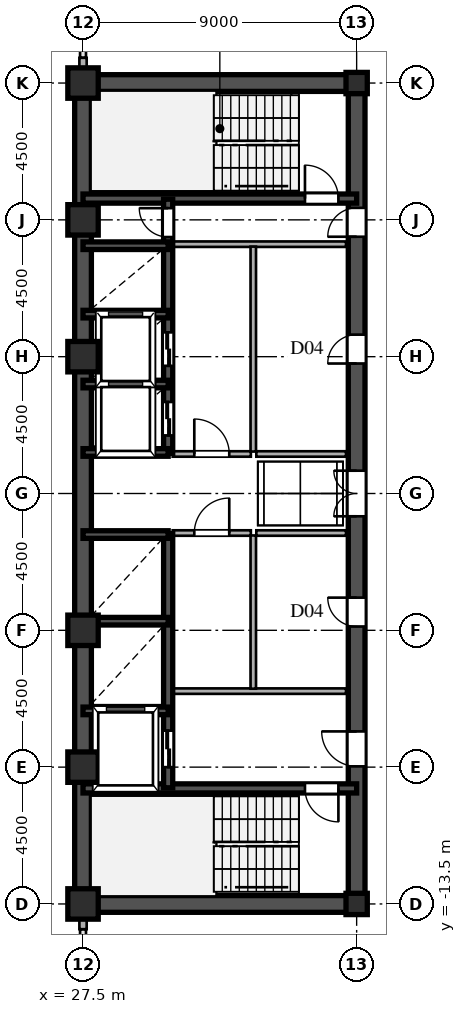
"""IFC4 building model, lengths in metres.
Left out: names, types, materials, properties, quantities, classifications, styles, units other than length and angle.
Written with IfcOpenShell. Run it as: python <this file> out.ifc"""

import sys

from ifc_helpers import new_model, si_unit, direction, frame, frame_2d, origin, origin_2d, place, context, subcontext, project, spatial, rectangle, hollow_rectangle, i_section, extrude, source, transform, mapped, element, fill, save


model = new_model("IFC4")
c1 = context("Model", 3, precision=1e-05, world=origin(), true_north=direction((0.0, 1.0)))
c2 = subcontext(c1, "Body", "Model", "MODEL_VIEW")
j1 = project(units=[si_unit("LENGTHUNIT", "METRE"), si_unit("PLANEANGLEUNIT", "RADIAN")], contexts=[c1])
p1 = place(None, origin())
s1 = spatial("IfcSite", under=j1, at=p1, CompositionType="ELEMENT")
p2 = place(p1, origin())
s2 = spatial("IfcBuilding", under=s1, at=p2, CompositionType="ELEMENT")
p3 = place(p2, frame((0.0, 0.0, 140.4)))
s3 = spatial("IfcBuildingStorey", under=s2, at=p3, CompositionType="ELEMENT", Elevation=140.4)
m1 = source(origin(), c2, "Body", "SweptSolid", [
    extrude(hollow_rectangle(XDim=1.0, YDim=1.0, WallThickness=0.042, at=origin_2d()), origin(), (0.0, 0.0, 1.0), 3.6),
])
for number, where, z_axis, x_axis in (
    (1, (27.5, -13.5, 0.0), (0.0, 0.0, 1.0), (1.0, 0.0, 0.0)),
    (2, (27.5, -9.0, 0.0), (0.0, 0.0, 1.0), (1.0, 0.0, 0.0)),
    (3, (27.5, -4.5, 0.0), (0.0, 0.0, 1.0), (1.0, 0.0, 0.0)),
    (4, (27.5, 4.5, 0.0), (0.0, 0.0, 1.0), (1.0, 0.0, 0.0)),
    (5, (27.5, 9.0, 0.0), (0.0, 0.0, 1.0), (1.0, 0.0, 0.0)),
    (6, (27.5, 13.5, 0.0), (0.0, 0.0, 1.0), (1.0, 0.0, 0.0)),
):
    element("IfcColumn", number, at=place(p3, frame(where, z_axis=z_axis, x_axis=x_axis)), inside=s3, PredefinedType="COLUMN", context=c2, shape_type="MappedRepresentation", body=[
        mapped(m1, transform((0.0, 0.0, 0.0), scale=1.0)),
    ])
m2 = source(origin(), c2, "Body", "SweptSolid", [
    extrude(i_section(OverallWidth=0.7, OverallDepth=0.7, WebThickness=0.028, FlangeThickness=0.045, at=origin_2d()), origin(), (0.0, 0.0, 1.0), 3.6),
])
for number, where, z_axis, x_axis in (
    (7, (36.5, -13.5, 0.0), (0.0, 0.0, 1.0), (1.0, 0.0, 0.0)),
    (8, (36.5, 13.5, 0.0), (0.0, 0.0, 1.0), (1.0, 0.0, 0.0)),
):
    element("IfcColumn", number, at=place(p3, frame(where, z_axis=z_axis, x_axis=x_axis)), inside=s3, PredefinedType="COLUMN", context=c2, shape_type="MappedRepresentation", body=[
        mapped(m2, transform((0.0, 0.0, 0.0), scale=1.0)),
    ])
for number, where, z_axis, x_axis in (
    (9, (27.5, -14.33, 0.0), (0.0, 0.0, 1.0), (0.0, 1.0, 0.0)),
    (10, (27.5, 13.78, 0.0), (0.0, 0.0, 1.0), (0.0, 1.0, 0.0)),
):
    element("IfcWall", number, at=place(p3, frame(where, z_axis=z_axis, x_axis=x_axis)), inside=s3, PredefinedType="SOLIDWALL", context=c2, shape_type="SweptSolid", body=[
        extrude(rectangle(XDim=0.55, YDim=0.24, at=frame_2d((0.275, 0.0))), origin(), (0.0, 0.0, 1.0), 2.88),
    ])
for number, where, z_axis, x_axis in (
    (11, (27.5, -13.5, 0.0), (0.0, 0.0, 1.0), (0.0, 1.0, 0.0)),
    (12, (27.5, 1.3, 0.0), (0.0, 0.0, 1.0), (0.0, 1.0, 0.0)),
):
    element("IfcWall", number, at=place(p3, frame(where, z_axis=z_axis, x_axis=x_axis)), inside=s3, PredefinedType="SHEAR", context=c2, shape_type="SweptSolid", body=[
        extrude(rectangle(XDim=12.2, YDim=0.55, at=frame_2d((6.1, 0.0))), origin(), (0.0, 0.0, 1.0), 3.38),
    ])
p4 = place(p3, frame((27.5, -1.3, 0.0), z_axis=(0.0, 0.0, 1.0), x_axis=(0.0, 1.0, 0.0)))
e13 = element("IfcWall", 13, at=p4, inside=s3, PredefinedType="SHEAR", context=c2, shape_type="SweptSolid", body=[
    extrude(rectangle(XDim=2.6, YDim=0.55, at=frame_2d((1.3, 0.0))), origin(), (0.0, 0.0, 1.0), 3.38),
])
for number, where, z_axis, x_axis in (
    (14, (27.5, -13.5, 0.0), (0.0, 0.0, 1.0), (1.0, 0.0, 0.0)),
    (15, (27.5, 13.5, 0.0), (0.0, 0.0, 1.0), (1.0, 0.0, 0.0)),
):
    element("IfcWall", number, at=place(p3, frame(where, z_axis=z_axis, x_axis=x_axis)), inside=s3, PredefinedType="SHEAR", context=c2, shape_type="SweptSolid", body=[
        extrude(rectangle(XDim=9.0, YDim=0.55, at=frame_2d((4.5, 0.0))), origin(), (0.0, 0.0, 1.0), 3.38),
    ])
p5 = place(p3, frame((36.5, -13.65, 0.0), z_axis=(0.0, 0.0, 1.0), x_axis=(0.0, 1.0, 0.0)))
e16 = element("IfcWall", 16, at=p5, inside=s3, PredefinedType="SHEAR", context=c2, shape_type="SweptSolid", body=[
    extrude(rectangle(XDim=7.15, YDim=0.55, at=frame_2d((3.575, 0.0))), origin(), (0.0, 0.0, 1.0), 3.38),
])
p6 = place(p5, frame((4.675, 0.0, 0.0)))
e17 = element("IfcOpeningElement", 17, at=p6, cuts=e16, PredefinedType="OPENING", context=c2, shape_type="SweptSolid", body=[
    extrude(rectangle(XDim=1.15, YDim=2.2, at=frame_2d((0.575, 1.1))), frame((0.0, 0.285, 0.0), z_axis=(0.0, -1.0, 0.0), x_axis=(1.0, 0.0, 0.0)), (0.0, 0.0, 1.0), 0.57),
])
p7 = place(p3, frame((36.5, -1.3, 0.0), z_axis=(0.0, 0.0, 1.0), x_axis=(0.0, 1.0, 0.0)))
e18 = element("IfcWall", 18, at=p7, inside=s3, PredefinedType="SHEAR", context=c2, shape_type="SweptSolid", body=[
    extrude(rectangle(XDim=2.6, YDim=0.55, at=frame_2d((1.3, 0.0))), origin(), (0.0, 0.0, 1.0), 3.38),
])
p8 = place(p7, frame((0.55, 0.0, 0.0)))
e19 = element("IfcOpeningElement", 19, at=p8, cuts=e18, PredefinedType="OPENING", context=c2, shape_type="SweptSolid", body=[
    extrude(rectangle(XDim=1.5, YDim=2.3, at=frame_2d((0.75, 1.15))), frame((0.0, 0.285, 0.0), z_axis=(0.0, -1.0, 0.0), x_axis=(1.0, 0.0, 0.0)), (0.0, 0.0, 1.0), 0.57),
])
p9 = place(p3, frame((36.5, 8.2, 0.0), z_axis=(0.0, 0.0, 1.0), x_axis=(0.0, 1.0, 0.0)))
e20 = element("IfcWall", 20, at=p9, inside=s3, PredefinedType="SHEAR", context=c2, shape_type="SweptSolid", body=[
    extrude(rectangle(XDim=5.45, YDim=0.55, at=frame_2d((2.725, 0.0))), origin(), (0.0, 0.0, 1.0), 3.38),
])
p10 = place(p9, frame((0.245, 0.0, 0.0)))
e21 = element("IfcOpeningElement", 21, at=p10, cuts=e20, PredefinedType="OPENING", context=c2, shape_type="SweptSolid", body=[
    extrude(rectangle(XDim=0.95, YDim=2.15, at=frame_2d((0.475, 1.075))), frame((0.0, 0.285, 0.0), z_axis=(0.0, -1.0, 0.0), x_axis=(1.0, 0.0, 0.0)), (0.0, 0.0, 1.0), 0.57),
])
p11 = place(p3, frame((36.5, -6.5, 0.0), z_axis=(0.0, 0.0, 1.0), x_axis=(0.0, 1.0, 0.0)))
e22 = element("IfcWall", 22, at=p11, inside=s3, PredefinedType="SHEAR", context=c2, shape_type="SweptSolid", body=[
    extrude(rectangle(XDim=5.2, YDim=0.55, at=frame_2d((2.6, 0.0))), origin(), (0.0, 0.0, 1.0), 3.38),
])
p12 = place(p11, frame((2.125, 0.0, 0.0)))
e23 = element("IfcOpeningElement", 23, at=p12, cuts=e22, PredefinedType="OPENING", context=c2, shape_type="SweptSolid", body=[
    extrude(rectangle(XDim=0.95, YDim=2.15, at=frame_2d((0.475, 1.075))), frame((0.0, 0.285, 0.0), z_axis=(0.0, -1.0, 0.0), x_axis=(1.0, 0.0, 0.0)), (0.0, 0.0, 1.0), 0.57),
])
p13 = place(p3, frame((36.5, 1.3, 0.0), z_axis=(0.0, 0.0, 1.0), x_axis=(0.0, 1.0, 0.0)))
e24 = element("IfcWall", 24, at=p13, inside=s3, PredefinedType="SHEAR", context=c2, shape_type="SweptSolid", body=[
    extrude(rectangle(XDim=6.9, YDim=0.55, at=frame_2d((3.45, 0.0))), origin(), (0.0, 0.0, 1.0), 3.38),
])
p14 = place(p13, frame((2.975, 0.0, 0.0)))
e25 = element("IfcOpeningElement", 25, at=p14, cuts=e24, PredefinedType="OPENING", context=c2, shape_type="SweptSolid", body=[
    extrude(rectangle(XDim=0.95, YDim=2.15, at=frame_2d((0.475, 1.075))), frame((0.0, 0.285, 0.0), z_axis=(0.0, -1.0, 0.0), x_axis=(1.0, 0.0, 0.0)), (0.0, 0.0, 1.0), 0.57),
])
p15 = place(p3, frame((27.5, -9.7, 0.0), z_axis=(0.0, 0.0, 1.0), x_axis=(1.0, 0.0, 0.0)))
e26 = element("IfcWall", 26, at=p15, inside=s3, PredefinedType="SHEAR", context=c2, shape_type="SweptSolid", body=[
    extrude(rectangle(XDim=9.0, YDim=0.3, at=frame_2d((4.5, 0.0))), origin(), (0.0, 0.0, 1.0), 3.38),
])
p16 = place(p15, frame((7.3, 0.0, 0.0)))
e27 = element("IfcOpeningElement", 27, at=p16, cuts=e26, PredefinedType="OPENING", context=c2, shape_type="SweptSolid", body=[
    extrude(rectangle(XDim=1.1, YDim=2.2, at=frame_2d((0.55, 1.1))), frame((0.0, 0.16, 0.0), z_axis=(0.0, -1.0, 0.0), x_axis=(1.0, 0.0, 0.0)), (0.0, 0.0, 1.0), 0.32),
])
p17 = place(p3, frame((27.5, 9.7, 0.0), z_axis=(0.0, 0.0, 1.0), x_axis=(1.0, 0.0, 0.0)))
e28 = element("IfcWall", 28, at=p17, inside=s3, PredefinedType="SHEAR", context=c2, shape_type="SweptSolid", body=[
    extrude(rectangle(XDim=9.0, YDim=0.3, at=frame_2d((4.5, 0.0))), origin(), (0.0, 0.0, 1.0), 3.38),
])
p18 = place(p17, frame((7.3, 0.0, 0.0)))
e29 = element("IfcOpeningElement", 29, at=p18, cuts=e28, PredefinedType="OPENING", context=c2, shape_type="SweptSolid", body=[
    extrude(rectangle(XDim=1.1, YDim=2.2, at=frame_2d((0.55, 1.1))), frame((0.0, 0.16, 0.0), z_axis=(0.0, -1.0, 0.0), x_axis=(1.0, 0.0, 0.0)), (0.0, 0.0, 1.0), 0.32),
])
for number, where, z_axis, x_axis in (
    (30, (27.5, -7.15, 0.0), (0.0, 0.0, 1.0), (1.0, 0.0, 0.0)),
    (31, (27.5, -4.2, 0.0), (0.0, 0.0, 1.0), (1.0, 0.0, 0.0)),
    (32, (27.5, -1.35, 0.0), (0.0, 0.0, 1.0), (1.0, 0.0, 0.0)),
    (33, (27.5, 1.35, 0.0), (0.0, 0.0, 1.0), (1.0, 0.0, 0.0)),
    (34, (27.5, 3.6, 0.0), (0.0, 0.0, 1.0), (1.0, 0.0, 0.0)),
    (35, (27.5, 5.9, 0.0), (0.0, 0.0, 1.0), (1.0, 0.0, 0.0)),
    (36, (27.5, 8.15, 0.0), (0.0, 0.0, 1.0), (1.0, 0.0, 0.0)),
):
    element("IfcWall", number, at=place(p3, frame(where, z_axis=z_axis, x_axis=x_axis)), inside=s3, PredefinedType="SHEAR", context=c2, shape_type="SweptSolid", body=[
        extrude(rectangle(XDim=2.8, YDim=0.25, at=frame_2d((1.4, 0.0))), origin(), (0.0, 0.0, 1.0), 3.38),
    ])
p19 = place(p3, frame((30.3, -9.68, 0.0), z_axis=(0.0, 0.0, 1.0), x_axis=(0.0, 1.0, 0.0)))
e37 = element("IfcWall", 37, at=p19, inside=s3, PredefinedType="SHEAR", context=c2, shape_type="SweptSolid", body=[
    extrude(rectangle(XDim=2.56, YDim=0.3, at=frame_2d((1.28, 0.0))), origin(), (0.0, 0.0, 1.0), 3.38),
])
p20 = place(p19, frame((0.68, 0.0, 0.0)))
e38 = element("IfcOpeningElement", 38, at=p20, cuts=e37, PredefinedType="OPENING", context=c2, shape_type="SweptSolid", body=[
    extrude(rectangle(XDim=1.2, YDim=2.25, at=frame_2d((0.6, 1.125))), frame((0.0, 0.16, 0.0), z_axis=(0.0, -1.0, 0.0), x_axis=(1.0, 0.0, 0.0)), (0.0, 0.0, 1.0), 0.32),
])
p21 = place(p3, frame((30.3, -7.12, 0.0), z_axis=(0.0, 0.0, 1.0), x_axis=(0.0, 1.0, 0.0)))
e39 = element("IfcWall", 39, at=p21, inside=s3, PredefinedType="SHEAR", context=c2, shape_type="SweptSolid", body=[
    extrude(rectangle(XDim=5.8, YDim=0.3, at=frame_2d((2.9, 0.0))), origin(), (0.0, 0.0, 1.0), 3.38),
])
p22 = place(p3, frame((30.3, 1.32, 0.0), z_axis=(0.0, 0.0, 1.0), x_axis=(0.0, 1.0, 0.0)))
e40 = element("IfcWall", 40, at=p22, inside=s3, PredefinedType="SHEAR", context=c2, shape_type="SweptSolid", body=[
    extrude(rectangle(XDim=2.28, YDim=0.3, at=frame_2d((1.14, 0.0))), origin(), (0.0, 0.0, 1.0), 3.38),
])
p23 = place(p22, frame((0.59, 0.0, 0.0)))
e41 = element("IfcOpeningElement", 41, at=p23, cuts=e40, PredefinedType="OPENING", context=c2, shape_type="SweptSolid", body=[
    extrude(rectangle(XDim=1.1, YDim=2.2, at=frame_2d((0.55, 1.1))), frame((0.0, 0.16, 0.0), z_axis=(0.0, -1.0, 0.0), x_axis=(1.0, 0.0, 0.0)), (0.0, 0.0, 1.0), 0.32),
])
p24 = place(p3, frame((30.3, 3.6, 0.0), z_axis=(0.0, 0.0, 1.0), x_axis=(0.0, 1.0, 0.0)))
e42 = element("IfcWall", 42, at=p24, inside=s3, PredefinedType="SHEAR", context=c2, shape_type="SweptSolid", body=[
    extrude(rectangle(XDim=2.3, YDim=0.3, at=frame_2d((1.15, 0.0))), origin(), (0.0, 0.0, 1.0), 3.38),
])
p25 = place(p24, frame((0.6, 0.0, 0.0)))
e43 = element("IfcOpeningElement", 43, at=p25, cuts=e42, PredefinedType="OPENING", context=c2, shape_type="SweptSolid", body=[
    extrude(rectangle(XDim=1.1, YDim=2.2, at=frame_2d((0.55, 1.1))), frame((0.0, 0.16, 0.0), z_axis=(0.0, -1.0, 0.0), x_axis=(1.0, 0.0, 0.0)), (0.0, 0.0, 1.0), 0.32),
])
p26 = place(p3, frame((30.3, 5.9, 0.0), z_axis=(0.0, 0.0, 1.0), x_axis=(0.0, 1.0, 0.0)))
e44 = element("IfcWall", 44, at=p26, inside=s3, PredefinedType="SHEAR", context=c2, shape_type="SweptSolid", body=[
    extrude(rectangle(XDim=2.25, YDim=0.3, at=frame_2d((1.125, 0.0))), origin(), (0.0, 0.0, 1.0), 3.38),
])
p27 = place(p3, frame((30.3, 8.15, 0.0), z_axis=(0.0, 0.0, 1.0), x_axis=(0.0, 1.0, 0.0)))
e45 = element("IfcWall", 45, at=p27, inside=s3, PredefinedType="SHEAR", context=c2, shape_type="SweptSolid", body=[
    extrude(rectangle(XDim=1.53, YDim=0.3, at=frame_2d((0.765, 0.0))), origin(), (0.0, 0.0, 1.0), 3.38),
])
p28 = place(p27, frame((0.285, 0.0, 0.0)))
e46 = element("IfcOpeningElement", 46, at=p28, cuts=e45, PredefinedType="OPENING", context=c2, shape_type="SweptSolid", body=[
    extrude(rectangle(XDim=0.95, YDim=2.15, at=frame_2d((0.475, 1.075))), frame((0.0, 0.16, 0.0), z_axis=(0.0, -1.0, 0.0), x_axis=(1.0, 0.0, 0.0)), (0.0, 0.0, 1.0), 0.32),
])
for number, where, z_axis, x_axis in (
    (47, (30.45, -6.5, 0.0), (0.0, 0.0, 1.0), (1.0, 0.0, 0.0)),
    (48, (30.45, 8.2, 0.0), (0.0, 0.0, 1.0), (1.0, 0.0, 0.0)),
):
    element("IfcWall", number, at=place(p3, frame(where, z_axis=z_axis, x_axis=x_axis)), inside=s3, PredefinedType="PARTITIONING", context=c2, shape_type="SweptSolid", body=[
        extrude(rectangle(XDim=5.7, YDim=0.18, at=frame_2d((2.85, 0.0))), origin(), (0.0, 0.0, 1.0), 3.38),
    ])
p29 = place(p3, frame((33.1, -6.42, 0.0), z_axis=(0.0, 0.0, 1.0), x_axis=(0.0, 1.0, 0.0)))
e49 = element("IfcWall", 49, at=p29, inside=s3, PredefinedType="PARTITIONING", context=c2, shape_type="SweptSolid", body=[
    extrude(rectangle(XDim=5.04, YDim=0.18, at=frame_2d((2.52, 0.0))), origin(), (0.0, 0.0, 1.0), 3.38),
])
p30 = place(p3, frame((33.1, 1.38, 0.0), z_axis=(0.0, 0.0, 1.0), x_axis=(0.0, 1.0, 0.0)))
e50 = element("IfcWall", 50, at=p30, inside=s3, PredefinedType="PARTITIONING", context=c2, shape_type="SweptSolid", body=[
    extrude(rectangle(XDim=6.74, YDim=0.18, at=frame_2d((3.37, 0.0))), origin(), (0.0, 0.0, 1.0), 3.38),
])
p31 = place(p3, frame((30.45, -1.3, 0.0), z_axis=(0.0, 0.0, 1.0), x_axis=(1.0, 0.0, 0.0)))
e51 = element("IfcWall", 51, at=p31, inside=s3, PredefinedType="PARTITIONING", context=c2, shape_type="SweptSolid", body=[
    extrude(rectangle(XDim=2.57, YDim=0.18, at=frame_2d((1.285, 0.0))), origin(), (0.0, 0.0, 1.0), 3.38),
])
p32 = place(p31, frame((0.71, 0.0, 0.0)))
e52 = element("IfcOpeningElement", 52, at=p32, cuts=e51, PredefinedType="OPENING", context=c2, shape_type="SweptSolid", body=[
    extrude(rectangle(XDim=1.15, YDim=2.2, at=frame_2d((0.575, 1.1))), frame((0.0, 0.1, 0.0), z_axis=(0.0, -1.0, 0.0), x_axis=(1.0, 0.0, 0.0)), (0.0, 0.0, 1.0), 0.2),
])
p33 = place(p3, frame((30.45, 1.3, 0.0), z_axis=(0.0, 0.0, 1.0), x_axis=(1.0, 0.0, 0.0)))
e53 = element("IfcWall", 53, at=p33, inside=s3, PredefinedType="PARTITIONING", context=c2, shape_type="SweptSolid", body=[
    extrude(rectangle(XDim=2.57, YDim=0.18, at=frame_2d((1.285, 0.0))), origin(), (0.0, 0.0, 1.0), 3.38),
])
p34 = place(p33, frame((0.71, 0.0, 0.0)))
e54 = element("IfcOpeningElement", 54, at=p34, cuts=e53, PredefinedType="OPENING", context=c2, shape_type="SweptSolid", body=[
    extrude(rectangle(XDim=1.15, YDim=2.2, at=frame_2d((0.575, 1.1))), frame((0.0, 0.1, 0.0), z_axis=(0.0, -1.0, 0.0), x_axis=(1.0, 0.0, 0.0)), (0.0, 0.0, 1.0), 0.2),
])
for number, where, z_axis, x_axis in (
    (55, (33.2, -1.3, 0.0), (0.0, 0.0, 1.0), (1.0, 0.0, 0.0)),
    (56, (33.2, 1.3, 0.0), (0.0, 0.0, 1.0), (1.0, 0.0, 0.0)),
):
    element("IfcWall", number, at=place(p3, frame(where, z_axis=z_axis, x_axis=x_axis)), inside=s3, PredefinedType="PARTITIONING", context=c2, shape_type="SweptSolid", body=[
        extrude(rectangle(XDim=2.95, YDim=0.18, at=frame_2d((1.475, 0.0))), origin(), (0.0, 0.0, 1.0), 3.38),
    ])
m3 = source(origin(), c2, "Body", "SweptSolid", [
    extrude(rectangle(XDim=1.15, YDim=2.2, at=frame_2d((0.575, 1.1))), frame((0.0, 0.025, 0.0), z_axis=(0.0, -1.0, 0.0), x_axis=(1.0, 0.0, 0.0)), (0.0, 0.0, 1.0), 0.05),
])
p35 = place(p6, origin())
e57 = element("IfcDoor", 57, at=p35, inside=s3, OperationType="SINGLE_SWING_RIGHT", PredefinedType="DOOR", context=c2, shape_type="MappedRepresentation", body=[
    mapped(m3, transform((0.0, 0.0, 0.0), scale=1.0)),
])
fill(e17, e57)
m4 = source(origin(), c2, "Body", "SweptSolid", [
    extrude(rectangle(XDim=1.5, YDim=2.3, at=frame_2d((0.75, 1.15))), frame((0.0, 0.025, 0.0), z_axis=(0.0, -1.0, 0.0), x_axis=(1.0, 0.0, 0.0)), (0.0, 0.0, 1.0), 0.05),
])
p36 = place(p8, origin())
e58 = element("IfcDoor", 58, at=p36, inside=s3, OperationType="DOUBLE_SWING_LEFT", PredefinedType="DOOR", context=c2, shape_type="MappedRepresentation", body=[
    mapped(m4, transform((0.0, 0.0, 0.0), scale=1.0)),
])
fill(e19, e58)
m5 = source(origin(), c2, "Body", "SweptSolid", [
    extrude(rectangle(XDim=0.95, YDim=2.15, at=frame_2d((0.475, 1.075))), frame((0.0, 0.025, 0.0), z_axis=(0.0, -1.0, 0.0), x_axis=(1.0, 0.0, 0.0)), (0.0, 0.0, 1.0), 0.05),
])
p37 = place(p10, origin())
e59 = element("IfcDoor", 59, at=p37, inside=s3, OperationType="SINGLE_SWING_LEFT", PredefinedType="DOOR", context=c2, shape_type="MappedRepresentation", body=[
    mapped(m5, transform((0.0, 0.0, 0.0), scale=1.0)),
])
fill(e21, e59)
p38 = place(p12, origin())
e60 = element("IfcDoor", 60, at=p38, inside=s3, OperationType="SINGLE_SWING_RIGHT", PredefinedType="DOOR", context=c2, shape_type="MappedRepresentation", body=[
    mapped(m5, transform((0.0, 0.0, 0.0), scale=1.0)),
])
fill(e23, e60)
p39 = place(p14, origin())
e61 = element("IfcDoor", 61, at=p39, inside=s3, OperationType="SINGLE_SWING_LEFT", PredefinedType="DOOR", context=c2, shape_type="MappedRepresentation", body=[
    mapped(m5, transform((0.0, 0.0, 0.0), scale=1.0)),
])
fill(e25, e61)
m6 = source(origin(), c2, "Body", "SweptSolid", [
    extrude(rectangle(XDim=1.1, YDim=2.2, at=frame_2d((0.55, 1.1))), frame((0.0, 0.025, 0.0), z_axis=(0.0, -1.0, 0.0), x_axis=(1.0, 0.0, 0.0)), (0.0, 0.0, 1.0), 0.05),
])
p40 = place(p16, frame((1.1, 0.0, 0.0), z_axis=(0.0, 0.0, 1.0), x_axis=(-1.0, 0.0, 0.0)))
e62 = element("IfcDoor", 62, at=p40, inside=s3, OperationType="SINGLE_SWING_RIGHT", PredefinedType="DOOR", context=c2, shape_type="MappedRepresentation", body=[
    mapped(m6, transform((0.0, 0.0, 0.0), scale=1.0)),
])
fill(e27, e62)
p41 = place(p18, origin())
e63 = element("IfcDoor", 63, at=p41, inside=s3, OperationType="SINGLE_SWING_LEFT", PredefinedType="DOOR", context=c2, shape_type="MappedRepresentation", body=[
    mapped(m6, transform((0.0, 0.0, 0.0), scale=1.0)),
])
fill(e29, e63)
m7 = source(origin(), c2, "Body", "SweptSolid", [
    extrude(rectangle(XDim=1.2, YDim=2.25, at=frame_2d((0.6, 1.125))), frame((0.0, 0.025, 0.0), z_axis=(0.0, -1.0, 0.0), x_axis=(1.0, 0.0, 0.0)), (0.0, 0.0, 1.0), 0.05),
])
p42 = place(p20, origin())
e64 = element("IfcDoor", 64, at=p42, inside=s3, OperationType="DOUBLE_DOOR_SLIDING", PredefinedType="DOOR", context=c2, shape_type="MappedRepresentation", body=[
    mapped(m7, transform((0.0, 0.0, 0.0), scale=1.0)),
])
fill(e38, e64)
m8 = source(origin(), c2, "Body", "SweptSolid", [
    extrude(rectangle(XDim=1.1, YDim=2.2, at=frame_2d((0.55, 1.1))), frame((0.0, 0.025, 0.0), z_axis=(0.0, -1.0, 0.0), x_axis=(1.0, 0.0, 0.0)), (0.0, 0.0, 1.0), 0.05),
])
p43 = place(p23, origin())
e65 = element("IfcDoor", 65, at=p43, inside=s3, OperationType="DOUBLE_DOOR_SLIDING", PredefinedType="DOOR", context=c2, shape_type="MappedRepresentation", body=[
    mapped(m8, transform((0.0, 0.0, 0.0), scale=1.0)),
])
fill(e41, e65)
p44 = place(p25, origin())
e66 = element("IfcDoor", 66, at=p44, inside=s3, OperationType="DOUBLE_DOOR_SLIDING", PredefinedType="DOOR", context=c2, shape_type="MappedRepresentation", body=[
    mapped(m8, transform((0.0, 0.0, 0.0), scale=1.0)),
])
fill(e43, e66)
p45 = place(p28, origin())
e67 = element("IfcDoor", 67, at=p45, inside=s3, OperationType="SINGLE_SWING_RIGHT", PredefinedType="DOOR", context=c2, shape_type="MappedRepresentation", body=[
    mapped(m5, transform((0.0, 0.0, 0.0), scale=1.0)),
])
fill(e46, e67)
p46 = place(p32, origin())
e68 = element("IfcDoor", 68, at=p46, inside=s3, OperationType="SINGLE_SWING_RIGHT", PredefinedType="DOOR", context=c2, shape_type="MappedRepresentation", body=[
    mapped(m3, transform((0.0, 0.0, 0.0), scale=1.0)),
])
fill(e52, e68)
p47 = place(p34, origin())
e69 = element("IfcDoor", 69, at=p47, inside=s3, OperationType="SINGLE_SWING_LEFT", PredefinedType="DOOR", context=c2, shape_type="MappedRepresentation", body=[
    mapped(m3, transform((0.0, 0.0, 0.0), scale=1.0)),
])
fill(e54, e69)
save(model, sys.argv[1])
